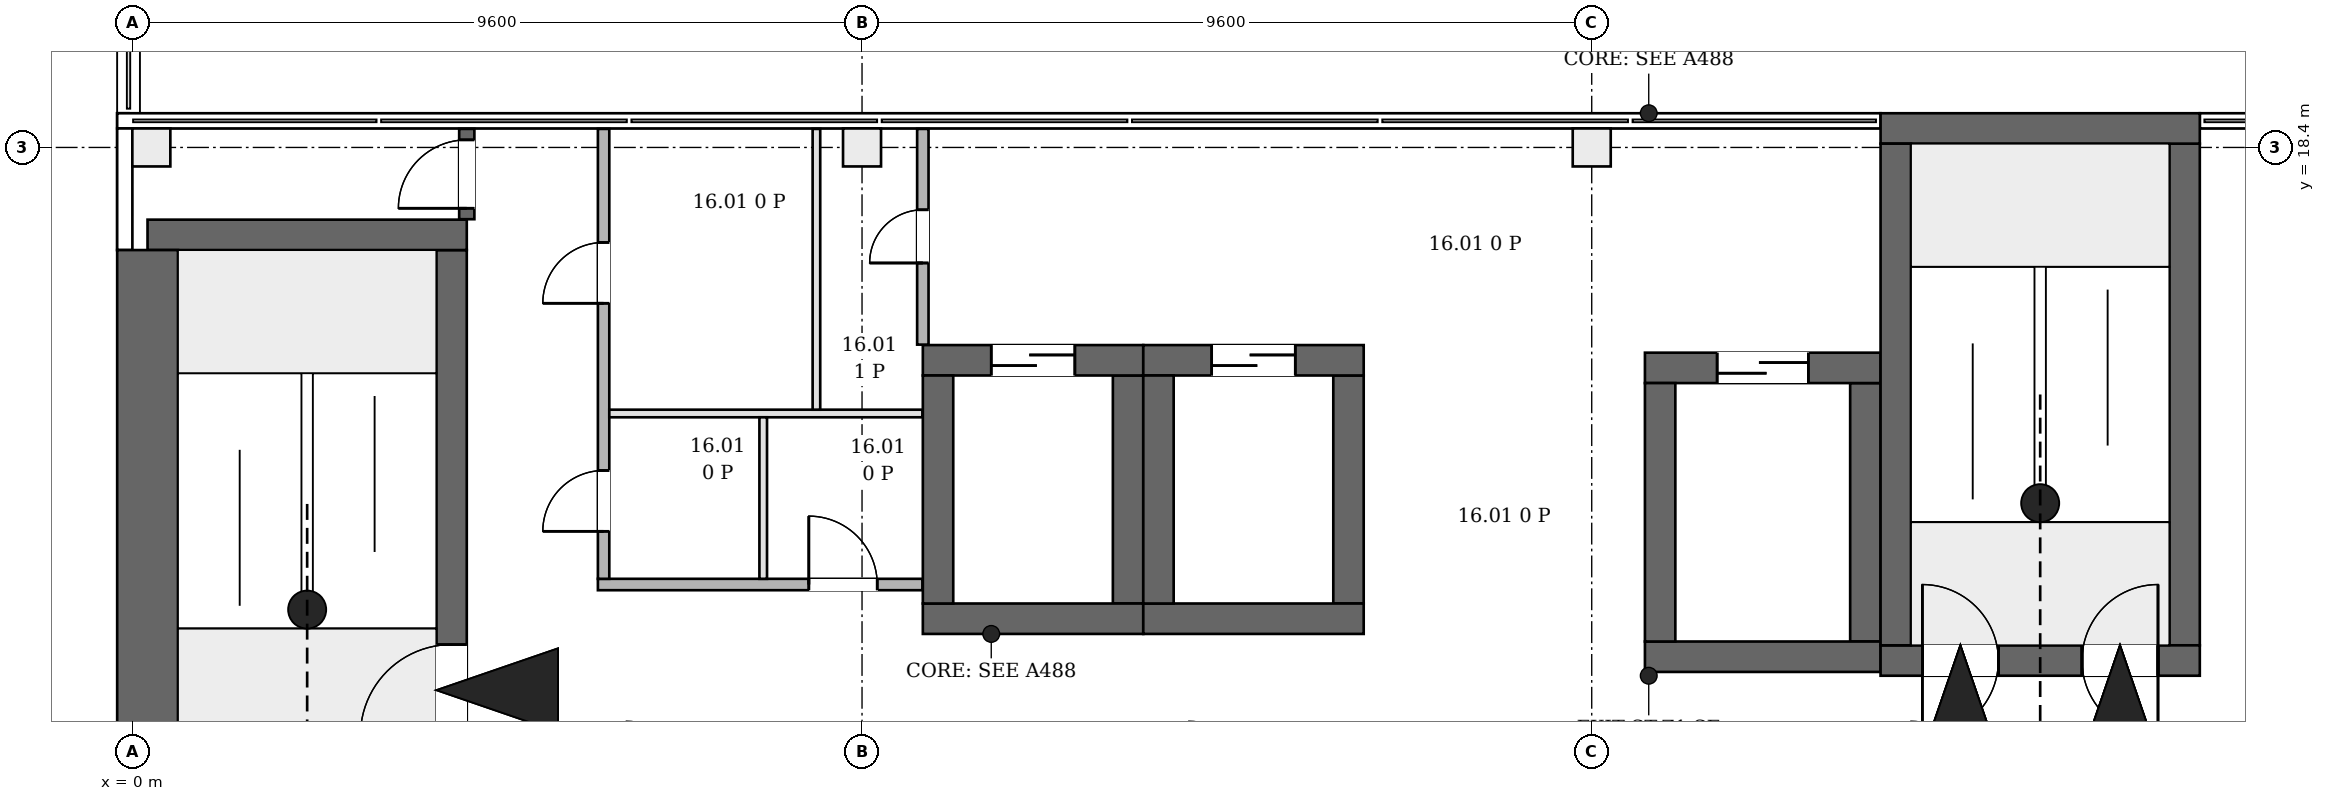
"""IFC4 building model, lengths in metres.
Left out: names, types, materials, properties, quantities, classifications, styles, units other than length and angle.
Written with IfcOpenShell. Run it as: python <this file> out.ifc"""

import sys

from ifc_helpers import new_model, si_unit, direction, frame, frame_2d, origin, origin_2d, place, context, subcontext, project, spatial, rectangle, extrude, element, fill, save


model = new_model("IFC4")
c1 = context("Model", 3, precision=1e-05, world=origin(), true_north=direction((0.0, 1.0)))
c2 = subcontext(c1, "Body", "Model", "MODEL_VIEW")
j1 = project(units=[si_unit("LENGTHUNIT", "METRE"), si_unit("PLANEANGLEUNIT", "RADIAN")], contexts=[c1])
p1 = place(None, origin())
s1 = spatial("IfcSite", under=j1, at=p1, CompositionType="ELEMENT")
p2 = place(p1, origin())
s2 = spatial("IfcBuilding", under=s1, at=p2, CompositionType="ELEMENT")
p3 = place(p2, frame((0.0, 0.0, 78.1)))
s3 = spatial("IfcBuildingStorey", under=s2, at=p3, CompositionType="ELEMENT", Elevation=78.1)
p4 = place(p3, frame((0.2, 17.25, 0.0), z_axis=(0.0, 0.0, 1.0), x_axis=(1.0, 0.0, 0.0)))
e1 = element("IfcWall", 1, at=p4, inside=s3, PredefinedType="SHEAR", context=c2, shape_type="SweptSolid", body=[
    extrude(rectangle(XDim=4.2, YDim=0.4, at=frame_2d((2.1, 0.0))), origin(), (0.0, 0.0, 1.0), 7.1),
])
p5 = place(p3, frame((0.2, 10.45, 0.0), z_axis=(0.0, 0.0, 1.0), x_axis=(0.0, 1.0, 0.0)))
e2 = element("IfcWall", 2, at=p5, inside=s3, PredefinedType="SHEAR", context=c2, shape_type="SweptSolid", body=[
    extrude(rectangle(XDim=6.6, YDim=0.8, at=frame_2d((3.3, 0.0))), origin(), (0.0, 0.0, 1.0), 7.1),
])
p6 = place(p3, frame((4.2, 10.45, 0.0), z_axis=(0.0, 0.0, 1.0), x_axis=(0.0, 1.0, 0.0)))
e3 = element("IfcWall", 3, at=p6, inside=s3, PredefinedType="SHEAR", context=c2, shape_type="SweptSolid", body=[
    extrude(rectangle(XDim=6.6, YDim=0.4, at=frame_2d((3.3, 0.0))), origin(), (0.0, 0.0, 1.0), 7.1),
])
p7 = place(p6, frame((0.21, 0.0, 0.0)))
e4 = element("IfcOpeningElement", 4, at=p7, cuts=e3, PredefinedType="OPENING", context=c2, shape_type="SweptSolid", body=[
    extrude(rectangle(XDim=1.2, YDim=2.1, at=frame_2d((0.6, 1.05))), frame((0.0, 0.21, 0.0), z_axis=(0.0, -1.0, 0.0), x_axis=(1.0, 0.0, 0.0)), (0.0, 0.0, 1.0), 0.42),
])
p8 = place(p3, frame((23.0, 11.65, 0.0), z_axis=(0.0, 0.0, 1.0), x_axis=(1.0, 0.0, 0.0)))
e5 = element("IfcWall", 5, at=p8, inside=s3, PredefinedType="SHEAR", context=c2, shape_type="SweptSolid", body=[
    extrude(rectangle(XDim=4.2, YDim=0.4, at=frame_2d((2.1, 0.0))), origin(), (0.0, 0.0, 1.0), 7.1),
])
p9 = place(p8, frame((0.55, 0.0, 0.0)))
e6 = element("IfcOpeningElement", 6, at=p9, cuts=e5, PredefinedType="OPENING", context=c2, shape_type="SweptSolid", body=[
    extrude(rectangle(XDim=1.0, YDim=2.1, at=frame_2d((0.5, 1.05))), frame((0.0, 0.21, 0.0), z_axis=(0.0, -1.0, 0.0), x_axis=(1.0, 0.0, 0.0)), (0.0, 0.0, 1.0), 0.42),
])
p10 = place(p8, frame((2.65, 0.0, 0.0)))
e7 = element("IfcOpeningElement", 7, at=p10, cuts=e5, PredefinedType="OPENING", context=c2, shape_type="SweptSolid", body=[
    extrude(rectangle(XDim=1.0, YDim=2.1, at=frame_2d((0.5, 1.05))), frame((0.0, 0.21, 0.0), z_axis=(0.0, -1.0, 0.0), x_axis=(1.0, 0.0, 0.0)), (0.0, 0.0, 1.0), 0.42),
])
p11 = place(p8, frame((0.55, 0.0, 4.2)))
e8 = element("IfcOpeningElement", 8, at=p11, cuts=e5, PredefinedType="OPENING", context=c2, shape_type="SweptSolid", body=[
    extrude(rectangle(XDim=1.0, YDim=2.1, at=frame_2d((0.5, 1.05))), frame((0.0, 0.21, 0.0), z_axis=(0.0, -1.0, 0.0), x_axis=(1.0, 0.0, 0.0)), (0.0, 0.0, 1.0), 0.42),
])
p12 = place(p8, frame((2.65, 0.0, 4.2)))
e9 = element("IfcOpeningElement", 9, at=p12, cuts=e5, PredefinedType="OPENING", context=c2, shape_type="SweptSolid", body=[
    extrude(rectangle(XDim=1.0, YDim=2.1, at=frame_2d((0.5, 1.05))), frame((0.0, 0.21, 0.0), z_axis=(0.0, -1.0, 0.0), x_axis=(1.0, 0.0, 0.0)), (0.0, 0.0, 1.0), 0.42),
])
p13 = place(p3, frame((23.0, 18.65, 0.0), z_axis=(0.0, 0.0, 1.0), x_axis=(1.0, 0.0, 0.0)))
e10 = element("IfcWall", 10, at=p13, inside=s3, PredefinedType="SHEAR", context=c2, shape_type="SweptSolid", body=[
    extrude(rectangle(XDim=4.2, YDim=0.4, at=frame_2d((2.1, 0.0))), origin(), (0.0, 0.0, 1.0), 7.1),
])
for number, where, z_axis, x_axis in (
    (11, (23.2, 11.85, 0.0), (0.0, 0.0, 1.0), (0.0, 1.0, 0.0)),
    (12, (27.0, 11.85, 0.0), (0.0, 0.0, 1.0), (0.0, 1.0, 0.0)),
):
    element("IfcWall", number, at=place(p3, frame(where, z_axis=z_axis, x_axis=x_axis)), inside=s3, PredefinedType="SHEAR", context=c2, shape_type="SweptSolid", body=[
        extrude(rectangle(XDim=6.6, YDim=0.4, at=frame_2d((3.3, 0.0))), origin(), (0.0, 0.0, 1.0), 7.1),
    ])
p14 = place(p3, frame((10.4, 12.2, 0.0), z_axis=(0.0, 0.0, 1.0), x_axis=(1.0, 0.0, 0.0)))
e13 = element("IfcWall", 13, at=p14, inside=s3, PredefinedType="SHEAR", context=c2, shape_type="SweptSolid", body=[
    extrude(rectangle(XDim=2.9, YDim=0.4, at=frame_2d((1.45, 0.0))), origin(), (0.0, 0.0, 1.0), 7.6),
])
p15 = place(p3, frame((10.4, 15.6, 0.0), z_axis=(0.0, 0.0, 1.0), x_axis=(1.0, 0.0, 0.0)))
e14 = element("IfcWall", 14, at=p15, inside=s3, PredefinedType="SHEAR", context=c2, shape_type="SweptSolid", body=[
    extrude(rectangle(XDim=2.9, YDim=0.4, at=frame_2d((1.45, 0.0))), origin(), (0.0, 0.0, 1.0), 7.6),
])
p16 = place(p15, frame((0.9, 0.0, 0.0)))
e15 = element("IfcOpeningElement", 15, at=p16, cuts=e14, PredefinedType="OPENING", context=c2, shape_type="SweptSolid", body=[
    extrude(rectangle(XDim=1.1, YDim=2.1, at=frame_2d((0.55, 1.05))), frame((0.0, 0.21, 0.0), z_axis=(0.0, -1.0, 0.0), x_axis=(1.0, 0.0, 0.0)), (0.0, 0.0, 1.0), 0.42),
])
for number, where, z_axis, x_axis in (
    (16, (10.6, 12.4, 0.0), (0.0, 0.0, 1.0), (0.0, 1.0, 0.0)),
    (17, (13.1, 12.4, 0.0), (0.0, 0.0, 1.0), (0.0, 1.0, 0.0)),
):
    element("IfcWall", number, at=place(p3, frame(where, z_axis=z_axis, x_axis=x_axis)), inside=s3, PredefinedType="SHEAR", context=c2, shape_type="SweptSolid", body=[
        extrude(rectangle(XDim=3.0, YDim=0.4, at=frame_2d((1.5, 0.0))), origin(), (0.0, 0.0, 1.0), 7.6),
    ])
p17 = place(p3, frame((13.3, 12.2, 0.0), z_axis=(0.0, 0.0, 1.0), x_axis=(1.0, 0.0, 0.0)))
e18 = element("IfcWall", 18, at=p17, inside=s3, PredefinedType="SHEAR", context=c2, shape_type="SweptSolid", body=[
    extrude(rectangle(XDim=2.9, YDim=0.4, at=frame_2d((1.45, 0.0))), origin(), (0.0, 0.0, 1.0), 7.6),
])
p18 = place(p3, frame((13.3, 15.6, 0.0), z_axis=(0.0, 0.0, 1.0), x_axis=(1.0, 0.0, 0.0)))
e19 = element("IfcWall", 19, at=p18, inside=s3, PredefinedType="SHEAR", context=c2, shape_type="SweptSolid", body=[
    extrude(rectangle(XDim=2.9, YDim=0.4, at=frame_2d((1.45, 0.0))), origin(), (0.0, 0.0, 1.0), 7.6),
])
p19 = place(p18, frame((0.9, 0.0, 0.0)))
e20 = element("IfcOpeningElement", 20, at=p19, cuts=e19, PredefinedType="OPENING", context=c2, shape_type="SweptSolid", body=[
    extrude(rectangle(XDim=1.1, YDim=2.1, at=frame_2d((0.55, 1.05))), frame((0.0, 0.21, 0.0), z_axis=(0.0, -1.0, 0.0), x_axis=(1.0, 0.0, 0.0)), (0.0, 0.0, 1.0), 0.42),
])
for number, where, z_axis, x_axis in (
    (21, (13.5, 12.4, 0.0), (0.0, 0.0, 1.0), (0.0, 1.0, 0.0)),
    (22, (16.0, 12.4, 0.0), (0.0, 0.0, 1.0), (0.0, 1.0, 0.0)),
):
    element("IfcWall", number, at=place(p3, frame(where, z_axis=z_axis, x_axis=x_axis)), inside=s3, PredefinedType="SHEAR", context=c2, shape_type="SweptSolid", body=[
        extrude(rectangle(XDim=3.0, YDim=0.4, at=frame_2d((1.5, 0.0))), origin(), (0.0, 0.0, 1.0), 7.6),
    ])
p20 = place(p3, frame((19.9, 11.7, 0.0), z_axis=(0.0, 0.0, 1.0), x_axis=(1.0, 0.0, 0.0)))
e23 = element("IfcWall", 23, at=p20, inside=s3, PredefinedType="SHEAR", context=c2, shape_type="SweptSolid", body=[
    extrude(rectangle(XDim=3.1, YDim=0.4, at=frame_2d((1.55, 0.0))), origin(), (0.0, 0.0, 1.0), 7.6),
])
p21 = place(p3, frame((19.9, 15.5, 0.0), z_axis=(0.0, 0.0, 1.0), x_axis=(1.0, 0.0, 0.0)))
e24 = element("IfcWall", 24, at=p21, inside=s3, PredefinedType="SHEAR", context=c2, shape_type="SweptSolid", body=[
    extrude(rectangle(XDim=3.1, YDim=0.4, at=frame_2d((1.55, 0.0))), origin(), (0.0, 0.0, 1.0), 7.6),
])
p22 = place(p21, frame((0.95, 0.0, 0.0)))
e25 = element("IfcOpeningElement", 25, at=p22, cuts=e24, PredefinedType="OPENING", context=c2, shape_type="SweptSolid", body=[
    extrude(rectangle(XDim=1.2, YDim=2.1, at=frame_2d((0.6, 1.05))), frame((0.0, 0.21, 0.0), z_axis=(0.0, -1.0, 0.0), x_axis=(1.0, 0.0, 0.0)), (0.0, 0.0, 1.0), 0.42),
])
for number, where, z_axis, x_axis in (
    (26, (20.1, 11.9, 0.0), (0.0, 0.0, 1.0), (0.0, 1.0, 0.0)),
    (27, (22.8, 11.9, 0.0), (0.0, 0.0, 1.0), (0.0, 1.0, 0.0)),
):
    element("IfcWall", number, at=place(p3, frame(where, z_axis=z_axis, x_axis=x_axis)), inside=s3, PredefinedType="SHEAR", context=c2, shape_type="SweptSolid", body=[
        extrude(rectangle(XDim=3.4, YDim=0.4, at=frame_2d((1.7, 0.0))), origin(), (0.0, 0.0, 1.0), 7.6),
    ])
for number, where, z_axis, x_axis in (
    (28, (0.25, 18.4, 0.0), (0.0, 0.0, 1.0), (1.0, 0.0, 0.0)),
    (29, (9.6, 18.4, 0.0), (0.0, 0.0, 1.0), (1.0, 0.0, 0.0)),
    (30, (19.2, 18.4, 0.0), (0.0, 0.0, 1.0), (1.0, 0.0, 0.0)),
):
    element("IfcColumn", number, at=place(p3, frame(where, z_axis=z_axis, x_axis=x_axis)), inside=s3, PredefinedType="COLUMN", context=c2, shape_type="SweptSolid", body=[
        extrude(rectangle(XDim=0.5, YDim=0.5, at=origin_2d()), origin(), (0.0, 0.0, 1.0), 3.9),
    ])
p23 = place(p3, frame((-0.125, 18.85, 0.0), z_axis=(0.0, 0.0, 1.0), x_axis=(0.0, -1.0, 0.0)))
e31 = element("IfcWall", 31, at=p23, inside=s3, PredefinedType="ELEMENTEDWALL", context=c2, shape_type="SweptSolid", body=[
    extrude(rectangle(XDim=1.8, YDim=0.15, at=frame_2d((0.9, 0.0))), origin(), (0.0, 0.0, 1.0), 3.9),
])
p24 = place(p3, frame((23.0, 18.75, 4.2), z_axis=(0.0, 0.0, 1.0), x_axis=(-1.0, 0.0, 0.0)))
e32 = element("IfcWall", 32, at=p24, inside=s3, PredefinedType="PARAPET", context=c2, shape_type="SweptSolid", body=[
    extrude(rectangle(XDim=23.2, YDim=0.2, at=frame_2d((11.6, 0.0))), origin(), (0.0, 0.0, 1.0), 1.1),
])
p25 = place(p3, frame((28.8, 18.75, 4.2), z_axis=(0.0, 0.0, 1.0), x_axis=(-1.0, 0.0, 0.0)))
e33 = element("IfcWall", 33, at=p25, inside=s3, PredefinedType="PARAPET", context=c2, shape_type="SweptSolid", body=[
    extrude(rectangle(XDim=1.6, YDim=0.2, at=frame_2d((0.8, 0.0))), origin(), (0.0, 0.0, 1.0), 1.1),
])
p26 = place(p3, frame((-0.099, 18.65, 4.2), z_axis=(0.0, 0.0, 1.0), x_axis=(0.0, -1.0, 0.0)))
e34 = element("IfcWall", 34, at=p26, inside=s3, PredefinedType="PARAPET", context=c2, shape_type="SweptSolid", body=[
    extrude(rectangle(XDim=1.6, YDim=0.2, at=frame_2d((0.8, 0.0))), origin(), (0.0, 0.0, 1.0), 1.1),
])
p27 = place(p3, frame((4.4, 17.456, 0.0), z_axis=(0.0, 0.0, 1.0), x_axis=(0.0, 1.0, 0.0)))
e35 = element("IfcWall", 35, at=p27, inside=s3, PredefinedType="PARTITIONING", context=c2, shape_type="SweptSolid", body=[
    extrude(rectangle(XDim=1.188, YDim=0.2, at=frame_2d((0.594, 0.0))), origin(), (0.0, 0.0, 1.0), 3.9),
])
p28 = place(p27, frame((0.144, 0.0, 0.0)))
e36 = element("IfcOpeningElement", 36, at=p28, cuts=e35, PredefinedType="OPENING", context=c2, shape_type="SweptSolid", body=[
    extrude(rectangle(XDim=0.9, YDim=2.1, at=frame_2d((0.45, 1.05))), frame((0.0, 0.11, 0.0), z_axis=(0.0, -1.0, 0.0), x_axis=(1.0, 0.0, 0.0)), (0.0, 0.0, 1.0), 0.22),
])
p29 = place(p3, frame((6.125, 12.65, 0.0), z_axis=(0.0, 0.0, 1.0), x_axis=(1.0, 0.0, 0.0)))
e37 = element("IfcWall", 37, at=p29, inside=s3, PredefinedType="PARTITIONING", context=c2, shape_type="SweptSolid", body=[
    extrude(rectangle(XDim=4.269, YDim=0.15, at=frame_2d((2.135, 0.0))), origin(), (0.0, 0.0, 1.0), 3.9),
])
p30 = place(p29, frame((2.775, 0.0, 0.0)))
e38 = element("IfcOpeningElement", 38, at=p30, cuts=e37, PredefinedType="OPENING", context=c2, shape_type="SweptSolid", body=[
    extrude(rectangle(XDim=0.9, YDim=2.1, at=frame_2d((0.45, 1.05))), frame((0.0, 0.085, 0.0), z_axis=(0.0, -1.0, 0.0), x_axis=(1.0, 0.0, 0.0)), (0.0, 0.0, 1.0), 0.17),
])
p31 = place(p3, frame((6.2, 12.725, 0.0), z_axis=(0.0, 0.0, 1.0), x_axis=(0.0, 1.0, 0.0)))
e39 = element("IfcWall", 39, at=p31, inside=s3, PredefinedType="PARTITIONING", context=c2, shape_type="SweptSolid", body=[
    extrude(rectangle(XDim=5.919, YDim=0.15, at=frame_2d((2.959, 0.0))), origin(), (0.0, 0.0, 1.0), 3.9),
])
p32 = place(p31, frame((0.625, 0.0, 0.0)))
e40 = element("IfcOpeningElement", 40, at=p32, cuts=e39, PredefinedType="OPENING", context=c2, shape_type="SweptSolid", body=[
    extrude(rectangle(XDim=0.8, YDim=2.1, at=frame_2d((0.4, 1.05))), frame((0.0, 0.085, 0.0), z_axis=(0.0, -1.0, 0.0), x_axis=(1.0, 0.0, 0.0)), (0.0, 0.0, 1.0), 0.17),
])
p33 = place(p31, frame((3.625, 0.0, 0.0)))
e41 = element("IfcOpeningElement", 41, at=p33, cuts=e39, PredefinedType="OPENING", context=c2, shape_type="SweptSolid", body=[
    extrude(rectangle(XDim=0.8, YDim=2.1, at=frame_2d((0.4, 1.05))), frame((0.0, 0.085, 0.0), z_axis=(0.0, -1.0, 0.0), x_axis=(1.0, 0.0, 0.0)), (0.0, 0.0, 1.0), 0.17),
])
p34 = place(p3, frame((6.275, 14.9, 0.0), z_axis=(0.0, 0.0, 1.0), x_axis=(1.0, 0.0, 0.0)))
e42 = element("IfcWall", 42, at=p34, inside=s3, PredefinedType="PARTITIONING", context=c2, shape_type="SweptSolid", body=[
    extrude(rectangle(XDim=4.119, YDim=0.1, at=frame_2d((2.06, 0.0))), origin(), (0.0, 0.0, 1.0), 3.9),
])
p35 = place(p3, frame((8.3, 12.725, 0.0), z_axis=(0.0, 0.0, 1.0), x_axis=(0.0, 1.0, 0.0)))
e43 = element("IfcWall", 43, at=p35, inside=s3, PredefinedType="PARTITIONING", context=c2, shape_type="SweptSolid", body=[
    extrude(rectangle(XDim=2.125, YDim=0.1, at=frame_2d((1.062, 0.0))), origin(), (0.0, 0.0, 1.0), 3.9),
])
p36 = place(p3, frame((9.0, 14.95, 0.0), z_axis=(0.0, 0.0, 1.0), x_axis=(0.0, 1.0, 0.0)))
e44 = element("IfcWall", 44, at=p36, inside=s3, PredefinedType="PARTITIONING", context=c2, shape_type="SweptSolid", body=[
    extrude(rectangle(XDim=3.694, YDim=0.1, at=frame_2d((1.847, 0.0))), origin(), (0.0, 0.0, 1.0), 3.9),
])
p37 = place(p3, frame((10.4, 15.806, 0.0), z_axis=(0.0, 0.0, 1.0), x_axis=(0.0, 1.0, 0.0)))
e45 = element("IfcWall", 45, at=p37, inside=s3, PredefinedType="PARTITIONING", context=c2, shape_type="SweptSolid", body=[
    extrude(rectangle(XDim=2.838, YDim=0.15, at=frame_2d((1.419, 0.0))), origin(), (0.0, 0.0, 1.0), 3.9),
])
p38 = place(p37, frame((1.074, 0.0, 0.0)))
e46 = element("IfcOpeningElement", 46, at=p38, cuts=e45, PredefinedType="OPENING", context=c2, shape_type="SweptSolid", body=[
    extrude(rectangle(XDim=0.7, YDim=2.1, at=frame_2d((0.35, 1.05))), frame((0.0, 0.085, 0.0), z_axis=(0.0, -1.0, 0.0), x_axis=(1.0, 0.0, 0.0)), (0.0, 0.0, 1.0), 0.17),
])
p39 = place(p7, origin())
e47 = element("IfcDoor", 47, at=p39, inside=s3, OperationType="SINGLE_SWING_RIGHT", PredefinedType="DOOR", context=c2, shape_type="SweptSolid", body=[
    extrude(rectangle(XDim=1.2, YDim=2.1, at=frame_2d((0.6, 1.05))), frame((0.0, 0.025, 0.0), z_axis=(0.0, -1.0, 0.0), x_axis=(1.0, 0.0, 0.0)), (0.0, 0.0, 1.0), 0.05),
])
fill(e4, e47)
p40 = place(p9, origin())
e48 = element("IfcDoor", 48, at=p40, inside=s3, OperationType="SINGLE_SWING_RIGHT", PredefinedType="DOOR", context=c2, shape_type="SweptSolid", body=[
    extrude(rectangle(XDim=1.0, YDim=2.1, at=frame_2d((0.5, 1.05))), frame((0.0, 0.025, 0.0), z_axis=(0.0, -1.0, 0.0), x_axis=(1.0, 0.0, 0.0)), (0.0, 0.0, 1.0), 0.05),
])
fill(e6, e48)
p41 = place(p10, origin())
e49 = element("IfcDoor", 49, at=p41, inside=s3, OperationType="SINGLE_SWING_LEFT", PredefinedType="DOOR", context=c2, shape_type="SweptSolid", body=[
    extrude(rectangle(XDim=1.0, YDim=2.1, at=frame_2d((0.5, 1.05))), frame((0.0, 0.025, 0.0), z_axis=(0.0, -1.0, 0.0), x_axis=(1.0, 0.0, 0.0)), (0.0, 0.0, 1.0), 0.05),
])
fill(e7, e49)
p42 = place(p11, frame((1.0, 0.0, 0.0), z_axis=(0.0, 0.0, 1.0), x_axis=(-1.0, 0.0, 0.0)))
e50 = element("IfcDoor", 50, at=p42, inside=s3, OperationType="SINGLE_SWING_LEFT", PredefinedType="DOOR", context=c2, shape_type="SweptSolid", body=[
    extrude(rectangle(XDim=1.0, YDim=2.1, at=frame_2d((0.5, 1.05))), frame((0.0, 0.025, 0.0), z_axis=(0.0, -1.0, 0.0), x_axis=(1.0, 0.0, 0.0)), (0.0, 0.0, 1.0), 0.05),
])
fill(e8, e50)
p43 = place(p12, frame((1.0, 0.0, 0.0), z_axis=(0.0, 0.0, 1.0), x_axis=(-1.0, 0.0, 0.0)))
e51 = element("IfcDoor", 51, at=p43, inside=s3, OperationType="SINGLE_SWING_RIGHT", PredefinedType="DOOR", context=c2, shape_type="SweptSolid", body=[
    extrude(rectangle(XDim=1.0, YDim=2.1, at=frame_2d((0.5, 1.05))), frame((0.0, 0.025, 0.0), z_axis=(0.0, -1.0, 0.0), x_axis=(1.0, 0.0, 0.0)), (0.0, 0.0, 1.0), 0.05),
])
fill(e9, e51)
p44 = place(p16, origin())
e52 = element("IfcDoor", 52, at=p44, inside=s3, OperationType="DOUBLE_DOOR_SLIDING", PredefinedType="DOOR", context=c2, shape_type="SweptSolid", body=[
    extrude(rectangle(XDim=1.1, YDim=2.1, at=frame_2d((0.55, 1.05))), frame((0.0, 0.025, 0.0), z_axis=(0.0, -1.0, 0.0), x_axis=(1.0, 0.0, 0.0)), (0.0, 0.0, 1.0), 0.05),
])
fill(e15, e52)
p45 = place(p19, origin())
e53 = element("IfcDoor", 53, at=p45, inside=s3, OperationType="DOUBLE_DOOR_SLIDING", PredefinedType="DOOR", context=c2, shape_type="SweptSolid", body=[
    extrude(rectangle(XDim=1.1, YDim=2.1, at=frame_2d((0.55, 1.05))), frame((0.0, 0.025, 0.0), z_axis=(0.0, -1.0, 0.0), x_axis=(1.0, 0.0, 0.0)), (0.0, 0.0, 1.0), 0.05),
])
fill(e20, e53)
p46 = place(p22, origin())
e54 = element("IfcDoor", 54, at=p46, inside=s3, OperationType="DOUBLE_DOOR_SLIDING", PredefinedType="DOOR", context=c2, shape_type="SweptSolid", body=[
    extrude(rectangle(XDim=1.2, YDim=2.1, at=frame_2d((0.6, 1.05))), frame((0.0, 0.025, 0.0), z_axis=(0.0, -1.0, 0.0), x_axis=(1.0, 0.0, 0.0)), (0.0, 0.0, 1.0), 0.05),
])
fill(e25, e54)
p47 = place(p28, origin())
e55 = element("IfcDoor", 55, at=p47, inside=s3, OperationType="SINGLE_SWING_LEFT", PredefinedType="DOOR", context=c2, shape_type="SweptSolid", body=[
    extrude(rectangle(XDim=0.9, YDim=2.1, at=frame_2d((0.45, 1.05))), frame((0.0, 0.025, 0.0), z_axis=(0.0, -1.0, 0.0), x_axis=(1.0, 0.0, 0.0)), (0.0, 0.0, 1.0), 0.05),
])
fill(e36, e55)
p48 = place(p32, origin())
e56 = element("IfcDoor", 56, at=p48, inside=s3, OperationType="SINGLE_SWING_LEFT", PredefinedType="DOOR", context=c2, shape_type="SweptSolid", body=[
    extrude(rectangle(XDim=0.8, YDim=2.1, at=frame_2d((0.4, 1.05))), frame((0.0, 0.025, 0.0), z_axis=(0.0, -1.0, 0.0), x_axis=(1.0, 0.0, 0.0)), (0.0, 0.0, 1.0), 0.05),
])
fill(e40, e56)
p49 = place(p30, origin())
e57 = element("IfcDoor", 57, at=p49, inside=s3, OperationType="SINGLE_SWING_RIGHT", PredefinedType="DOOR", context=c2, shape_type="SweptSolid", body=[
    extrude(rectangle(XDim=0.9, YDim=2.1, at=frame_2d((0.45, 1.05))), frame((0.0, 0.025, 0.0), z_axis=(0.0, -1.0, 0.0), x_axis=(1.0, 0.0, 0.0)), (0.0, 0.0, 1.0), 0.05),
])
fill(e38, e57)
p50 = place(p33, origin())
e58 = element("IfcDoor", 58, at=p50, inside=s3, OperationType="SINGLE_SWING_LEFT", PredefinedType="DOOR", context=c2, shape_type="SweptSolid", body=[
    extrude(rectangle(XDim=0.8, YDim=2.1, at=frame_2d((0.4, 1.05))), frame((0.0, 0.025, 0.0), z_axis=(0.0, -1.0, 0.0), x_axis=(1.0, 0.0, 0.0)), (0.0, 0.0, 1.0), 0.05),
])
fill(e41, e58)
p51 = place(p38, origin())
e59 = element("IfcDoor", 59, at=p51, inside=s3, OperationType="SINGLE_SWING_LEFT", PredefinedType="DOOR", context=c2, shape_type="SweptSolid", body=[
    extrude(rectangle(XDim=0.7, YDim=2.1, at=frame_2d((0.35, 1.05))), frame((0.0, 0.025, 0.0), z_axis=(0.0, -1.0, 0.0), x_axis=(1.0, 0.0, 0.0)), (0.0, 0.0, 1.0), 0.05),
])
fill(e46, e59)
save(model, sys.argv[1])
